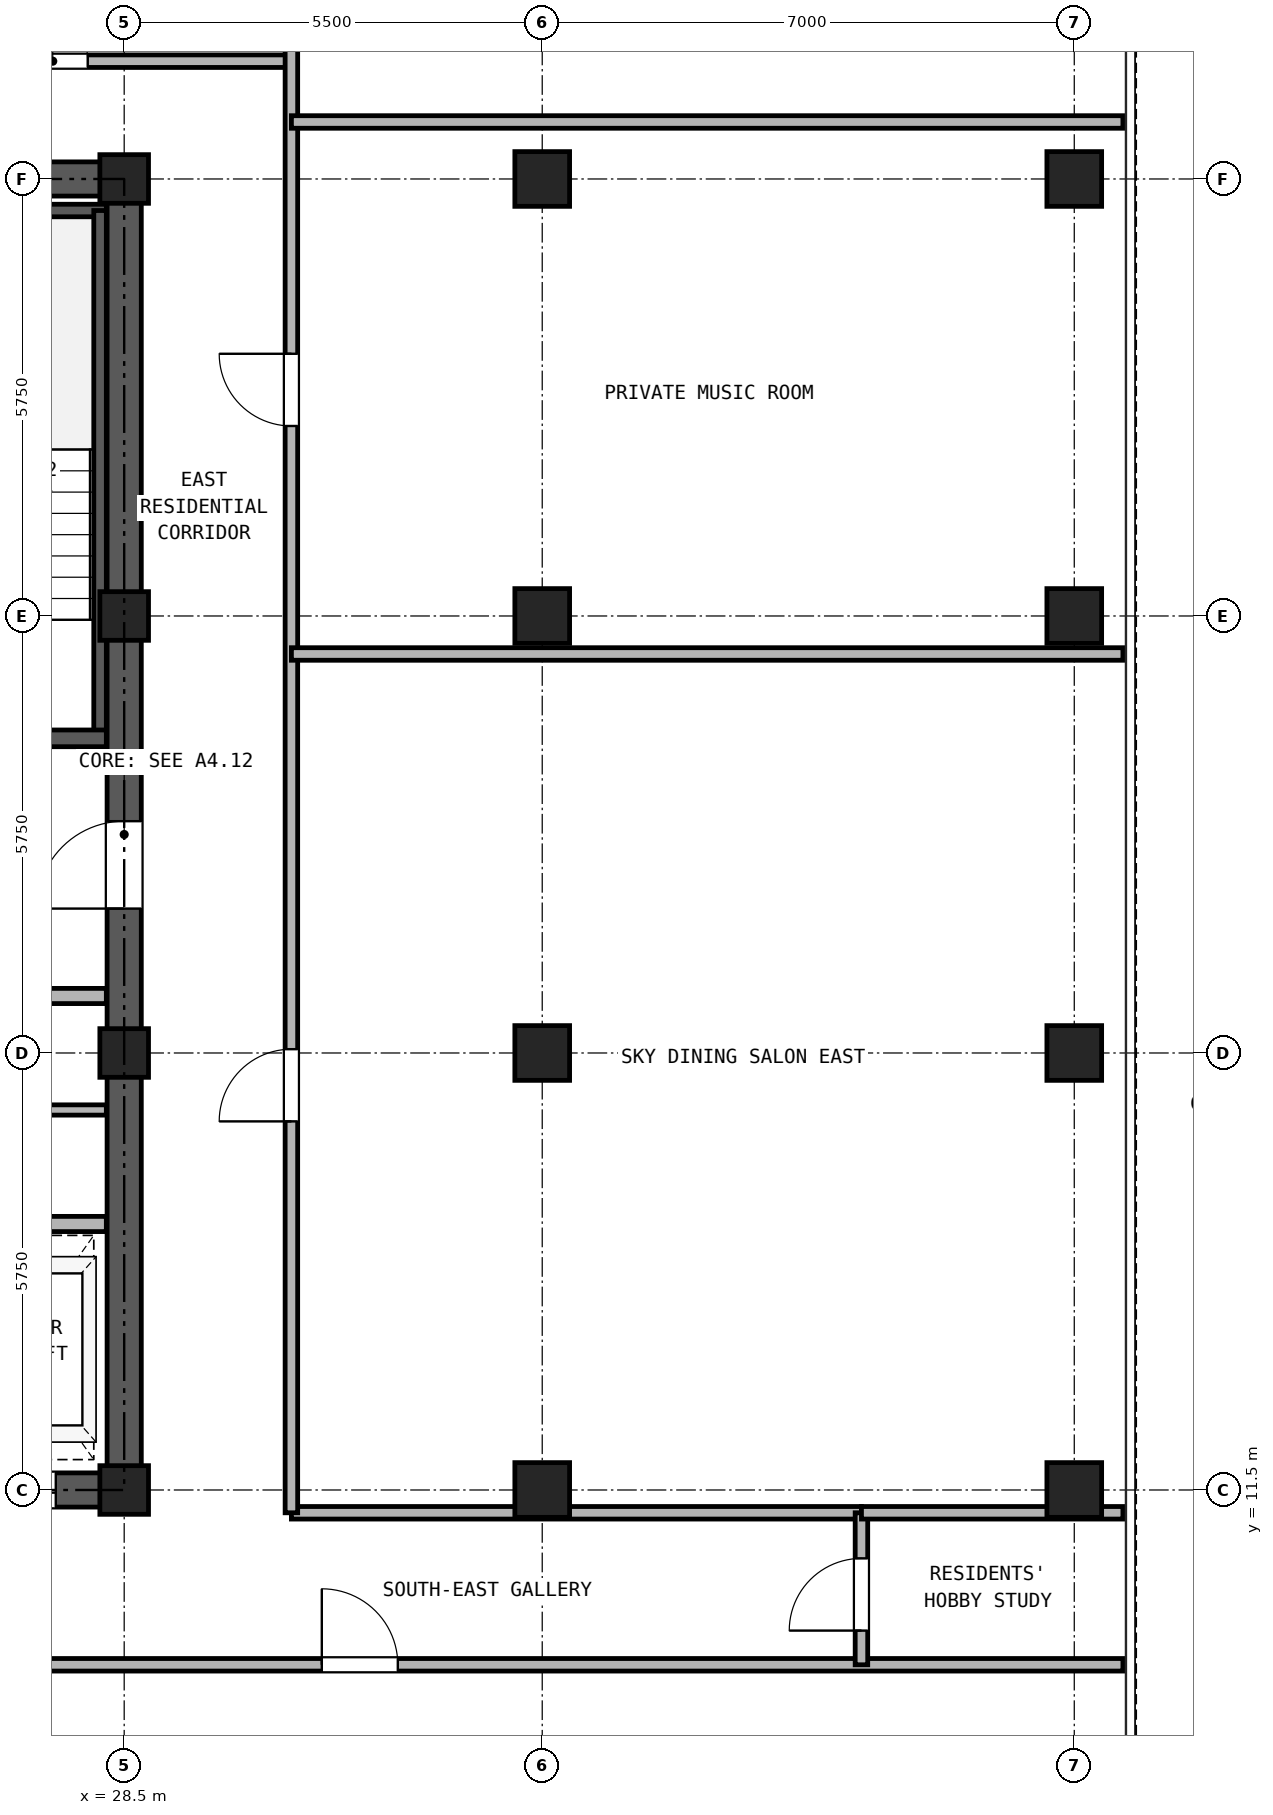
"""IFC4 building model, lengths in metres.
Left out: names, types, materials, properties, quantities, classifications, styles, units other than length and angle.
Written with IfcOpenShell. Run it as: python <this file> out.ifc"""

import sys

from ifc_helpers import new_model, si_unit, direction, frame, frame_2d, origin, origin_2d, place, context, subcontext, project, spatial, rectangle, hollow_rectangle, extrude, source, transform, mapped, element, fill, save


model = new_model("IFC4")
c1 = context("Model", 3, precision=1e-05, world=origin(), true_north=direction((0.0, 1.0)))
c2 = subcontext(c1, "Body", "Model", "MODEL_VIEW")
j1 = project(units=[si_unit("LENGTHUNIT", "METRE"), si_unit("PLANEANGLEUNIT", "RADIAN")], contexts=[c1])
p1 = place(None, origin())
s1 = spatial("IfcSite", under=j1, at=p1, CompositionType="ELEMENT")
p2 = place(p1, origin())
s2 = spatial("IfcBuilding", under=s1, at=p2, CompositionType="ELEMENT")
p3 = place(p2, frame((0.0, 0.0, 184.9)))
s3 = spatial("IfcBuildingStorey", under=s2, at=p3, CompositionType="ELEMENT", Elevation=184.9)
m1 = source(origin(), c2, "Body", "SweptSolid", [
    extrude(hollow_rectangle(XDim=0.72, YDim=0.72, WallThickness=0.04, at=origin_2d()), origin(), (0.0, 0.0, 1.0), 2.84),
])
for number, where, z_axis, x_axis in (
    (1, (41.0, 11.5, 0.0), (0.0, 0.0, 1.0), (1.0, 0.0, 0.0)),
    (2, (41.0, 17.25, 0.0), (0.0, 0.0, 1.0), (1.0, 0.0, 0.0)),
    (3, (41.0, 23.0, 0.0), (0.0, 0.0, 1.0), (1.0, 0.0, 0.0)),
    (4, (41.0, 28.75, 0.0), (0.0, 0.0, 1.0), (1.0, 0.0, 0.0)),
):
    element("IfcColumn", number, at=place(p3, frame(where, z_axis=z_axis, x_axis=x_axis)), inside=s3, PredefinedType="COLUMN", context=c2, shape_type="MappedRepresentation", body=[
        mapped(m1, transform((0.0, 0.0, 0.0), x_axis=(1.0, 0.0, 0.0), y_axis=(0.0, 1.0, 0.0), z_axis=(0.0, 0.0, 1.0), scale=1.0)),
    ])
m2 = source(origin(), c2, "Body", "SweptSolid", [
    extrude(hollow_rectangle(XDim=0.64, YDim=0.64, WallThickness=0.035, at=origin_2d()), origin(), (0.0, 0.0, 1.0), 2.84),
])
for number, where, z_axis, x_axis in (
    (5, (28.5, 11.5, 0.0), (0.0, 0.0, 1.0), (1.0, 0.0, 0.0)),
    (6, (28.5, 17.25, 0.0), (0.0, 0.0, 1.0), (1.0, 0.0, 0.0)),
    (7, (28.5, 23.0, 0.0), (0.0, 0.0, 1.0), (1.0, 0.0, 0.0)),
    (8, (28.5, 28.75, 0.0), (0.0, 0.0, 1.0), (1.0, 0.0, 0.0)),
):
    element("IfcColumn", number, at=place(p3, frame(where, z_axis=z_axis, x_axis=x_axis)), inside=s3, PredefinedType="COLUMN", context=c2, shape_type="MappedRepresentation", body=[
        mapped(m2, transform((0.0, 0.0, 0.0), x_axis=(1.0, 0.0, 0.0), y_axis=(0.0, 1.0, 0.0), z_axis=(0.0, 0.0, 1.0), scale=1.0)),
    ])
for number, where, z_axis, x_axis in (
    (9, (34.0, 11.5, 0.0), (0.0, 0.0, 1.0), (1.0, 0.0, 0.0)),
    (10, (34.0, 17.25, 0.0), (0.0, 0.0, 1.0), (1.0, 0.0, 0.0)),
    (11, (34.0, 23.0, 0.0), (0.0, 0.0, 1.0), (1.0, 0.0, 0.0)),
    (12, (34.0, 28.75, 0.0), (0.0, 0.0, 1.0), (1.0, 0.0, 0.0)),
):
    element("IfcColumn", number, at=place(p3, frame(where, z_axis=z_axis, x_axis=x_axis)), inside=s3, PredefinedType="COLUMN", context=c2, shape_type="MappedRepresentation", body=[
        mapped(m1, transform((0.0, 0.0, 0.0), x_axis=(1.0, 0.0, 0.0), y_axis=(0.0, 1.0, 0.0), z_axis=(0.0, 0.0, 1.0), scale=1.0)),
    ])
p4 = place(p3, frame((18.275, 11.5, 0.0), z_axis=(0.0, 0.0, 1.0), x_axis=(1.0, 0.0, 0.0)))
e13 = element("IfcWall", 13, at=p4, inside=s3, PredefinedType="SHEAR", context=c2, shape_type="SweptSolid", body=[
    extrude(rectangle(XDim=10.45, YDim=0.45, at=frame_2d((5.225, 0.0))), origin(), (0.0, 0.0, 1.0), 2.84),
])
p5 = place(p4, frame((1.825, 0.0, 0.0)))
e14 = element("IfcOpeningElement", 14, at=p5, cuts=e13, PredefinedType="OPENING", context=c2, shape_type="SweptSolid", body=[
    extrude(rectangle(XDim=0.95, YDim=2.15, at=frame_2d((0.475, 1.075))), frame((0.0, 0.235, 0.0), z_axis=(0.0, -1.0, 0.0), x_axis=(1.0, 0.0, 0.0)), (0.0, 0.0, 1.0), 0.47),
])
p6 = place(p4, frame((5.325, 0.0, 0.0)))
e15 = element("IfcOpeningElement", 15, at=p6, cuts=e13, PredefinedType="OPENING", context=c2, shape_type="SweptSolid", body=[
    extrude(rectangle(XDim=0.95, YDim=2.15, at=frame_2d((0.475, 1.075))), frame((0.0, 0.235, 0.0), z_axis=(0.0, -1.0, 0.0), x_axis=(1.0, 0.0, 0.0)), (0.0, 0.0, 1.0), 0.47),
])
p7 = place(p4, frame((8.225, 0.0, 0.0)))
e16 = element("IfcOpeningElement", 16, at=p7, cuts=e13, PredefinedType="OPENING", context=c2, shape_type="SweptSolid", body=[
    extrude(rectangle(XDim=1.1, YDim=2.25, at=frame_2d((0.55, 1.125))), frame((0.0, 0.235, 0.0), z_axis=(0.0, -1.0, 0.0), x_axis=(1.0, 0.0, 0.0)), (0.0, 0.0, 1.0), 0.47),
])
p8 = place(p3, frame((18.275, 28.75, 0.0), z_axis=(0.0, 0.0, 1.0), x_axis=(1.0, 0.0, 0.0)))
e17 = element("IfcWall", 17, at=p8, inside=s3, PredefinedType="SHEAR", context=c2, shape_type="SweptSolid", body=[
    extrude(rectangle(XDim=10.45, YDim=0.45, at=frame_2d((5.225, 0.0))), origin(), (0.0, 0.0, 1.0), 2.84),
])
p9 = place(p8, frame((4.105, 0.0, 0.0)))
e18 = element("IfcOpeningElement", 18, at=p9, cuts=e17, PredefinedType="OPENING", context=c2, shape_type="SweptSolid", body=[
    extrude(rectangle(XDim=0.9, YDim=2.05, at=frame_2d((0.45, 1.025))), frame((0.0, 0.235, 0.0), z_axis=(0.0, -1.0, 0.0), x_axis=(1.0, 0.0, 0.0)), (0.0, 0.0, 1.0), 0.47),
])
p10 = place(p8, frame((5.645, 0.0, 0.0)))
e19 = element("IfcOpeningElement", 19, at=p10, cuts=e17, PredefinedType="OPENING", context=c2, shape_type="SweptSolid", body=[
    extrude(rectangle(XDim=0.9, YDim=2.05, at=frame_2d((0.45, 1.025))), frame((0.0, 0.235, 0.0), z_axis=(0.0, -1.0, 0.0), x_axis=(1.0, 0.0, 0.0)), (0.0, 0.0, 1.0), 0.47),
])
p11 = place(p3, frame((28.5, 11.725, 0.0), z_axis=(0.0, 0.0, 1.0), x_axis=(0.0, 1.0, 0.0)))
e20 = element("IfcWall", 20, at=p11, inside=s3, PredefinedType="SHEAR", context=c2, shape_type="SweptSolid", body=[
    extrude(rectangle(XDim=16.8, YDim=0.45, at=frame_2d((8.4, 0.0))), origin(), (0.0, 0.0, 1.0), 2.84),
])
p12 = place(p11, frame((7.425, 0.0, 0.0)))
e21 = element("IfcOpeningElement", 21, at=p12, cuts=e20, PredefinedType="OPENING", context=c2, shape_type="SweptSolid", body=[
    extrude(rectangle(XDim=1.15, YDim=2.2, at=frame_2d((0.575, 1.1))), frame((0.0, 0.235, 0.0), z_axis=(0.0, -1.0, 0.0), x_axis=(1.0, 0.0, 0.0)), (0.0, 0.0, 1.0), 0.47),
])
p13 = place(p3, frame((25.13, 28.335, 0.0), z_axis=(0.0, 0.0, 1.0), x_axis=(1.0, 0.0, 0.0)))
e22 = element("IfcWall", 22, at=p13, inside=s3, PredefinedType="PARTITIONING", context=c2, shape_type="SweptSolid", body=[
    extrude(rectangle(XDim=3.135, YDim=0.165, at=frame_2d((1.567, 0.0))), origin(), (0.0, 0.0, 1.0), 2.84),
])
p14 = place(p3, frame((28.183, 21.39, 0.0), z_axis=(0.0, 0.0, 1.0), x_axis=(0.0, 1.0, 0.0)))
e23 = element("IfcWall", 23, at=p14, inside=s3, PredefinedType="PARTITIONING", context=c2, shape_type="SweptSolid", body=[
    extrude(rectangle(XDim=6.945, YDim=0.165, at=frame_2d((3.473, 0.0))), origin(), (0.0, 0.0, 1.0), 2.84),
])
p15 = place(p3, frame((25.13, 21.39, 0.0), z_axis=(0.0, 0.0, 1.0), x_axis=(1.0, 0.0, 0.0)))
e24 = element("IfcWall", 24, at=p15, inside=s3, PredefinedType="SOLIDWALL", context=c2, shape_type="SweptSolid", body=[
    extrude(rectangle(XDim=3.135, YDim=0.22, at=frame_2d((1.567, 0.0))), origin(), (0.0, 0.0, 1.0), 2.84),
])
p16 = place(p15, frame((0.92, 0.0, 0.0)))
e25 = element("IfcOpeningElement", 25, at=p16, cuts=e24, PredefinedType="OPENING", context=c2, shape_type="SweptSolid", body=[
    extrude(rectangle(XDim=1.15, YDim=2.2, at=frame_2d((0.575, 1.1))), frame((0.0, 0.12, 0.0), z_axis=(0.0, -1.0, 0.0), x_axis=(1.0, 0.0, 0.0)), (0.0, 0.0, 1.0), 0.24),
])
p17 = place(p3, frame((18.735, 18.0, 0.0), z_axis=(0.0, 0.0, 1.0), x_axis=(1.0, 0.0, 0.0)))
e26 = element("IfcWall", 26, at=p17, inside=s3, PredefinedType="PARTITIONING", context=c2, shape_type="SweptSolid", body=[
    extrude(rectangle(XDim=9.53, YDim=0.2, at=frame_2d((4.765, 0.0))), origin(), (0.0, 0.0, 1.0), 2.84),
])
p18 = place(p17, frame((0.515, 0.0, 0.0)))
e27 = element("IfcOpeningElement", 27, at=p18, cuts=e26, PredefinedType="OPENING", context=c2, shape_type="SweptSolid", body=[
    extrude(rectangle(XDim=1.3, YDim=2.3, at=frame_2d((0.65, 1.15))), frame((0.0, 0.11, 0.0), z_axis=(0.0, -1.0, 0.0), x_axis=(1.0, 0.0, 0.0)), (0.0, 0.0, 1.0), 0.22),
])
p19 = place(p17, frame((2.615, 0.0, 0.0)))
e28 = element("IfcOpeningElement", 28, at=p19, cuts=e26, PredefinedType="OPENING", context=c2, shape_type="SweptSolid", body=[
    extrude(rectangle(XDim=1.3, YDim=2.3, at=frame_2d((0.65, 1.15))), frame((0.0, 0.11, 0.0), z_axis=(0.0, -1.0, 0.0), x_axis=(1.0, 0.0, 0.0)), (0.0, 0.0, 1.0), 0.22),
])
p20 = place(p17, frame((7.115, 0.0, 0.0)))
e29 = element("IfcOpeningElement", 29, at=p20, cuts=e26, PredefinedType="OPENING", context=c2, shape_type="SweptSolid", body=[
    extrude(rectangle(XDim=1.0, YDim=2.15, at=frame_2d((0.5, 1.075))), frame((0.0, 0.11, 0.0), z_axis=(0.0, -1.0, 0.0), x_axis=(1.0, 0.0, 0.0)), (0.0, 0.0, 1.0), 0.22),
])
p21 = place(p3, frame((18.735, 15.0, 0.0), z_axis=(0.0, 0.0, 1.0), x_axis=(1.0, 0.0, 0.0)))
e30 = element("IfcWall", 30, at=p21, inside=s3, PredefinedType="PARTITIONING", context=c2, shape_type="SweptSolid", body=[
    extrude(rectangle(XDim=9.53, YDim=0.2, at=frame_2d((4.765, 0.0))), origin(), (0.0, 0.0, 1.0), 2.84),
])
p22 = place(p3, frame((23.3, 16.5, 0.0), z_axis=(0.0, 0.0, 1.0), x_axis=(1.0, 0.0, 0.0)))
e31 = element("IfcWall", 31, at=p22, inside=s3, PredefinedType="PARTITIONING", context=c2, shape_type="SweptSolid", body=[
    extrude(rectangle(XDim=4.965, YDim=0.135, at=frame_2d((2.482, 0.0))), origin(), (0.0, 0.0, 1.0), 2.84),
])
p23 = place(p22, frame((2.55, 0.0, 0.0)))
e32 = element("IfcOpeningElement", 32, at=p23, cuts=e31, PredefinedType="OPENING", context=c2, shape_type="SweptSolid", body=[
    extrude(rectangle(XDim=0.9, YDim=2.05, at=frame_2d((0.45, 1.025))), frame((0.0, 0.077, 0.0), z_axis=(0.0, -1.0, 0.0), x_axis=(1.0, 0.0, 0.0)), (0.0, 0.0, 1.0), 0.155),
])
p24 = place(p3, frame((0.16, 9.2, 0.0), z_axis=(0.0, 0.0, 1.0), x_axis=(1.0, 0.0, 0.0)))
e33 = element("IfcWall", 33, at=p24, inside=s3, PredefinedType="PARTITIONING", context=c2, shape_type="SweptSolid", body=[
    extrude(rectangle(XDim=41.48, YDim=0.165, at=frame_2d((20.74, 0.0))), origin(), (0.0, 0.0, 1.0), 2.84),
])
p25 = place(p24, frame((15.565, 0.0, 0.0)))
e34 = element("IfcOpeningElement", 34, at=p25, cuts=e33, PredefinedType="OPENING", context=c2, shape_type="SweptSolid", body=[
    extrude(rectangle(XDim=1.0, YDim=2.15, at=frame_2d((0.5, 1.075))), frame((0.0, 0.093, 0.0), z_axis=(0.0, -1.0, 0.0), x_axis=(1.0, 0.0, 0.0)), (0.0, 0.0, 1.0), 0.185),
])
p26 = place(p24, frame((30.94, 0.0, 0.0)))
e35 = element("IfcOpeningElement", 35, at=p26, cuts=e33, PredefinedType="OPENING", context=c2, shape_type="SweptSolid", body=[
    extrude(rectangle(XDim=1.0, YDim=2.15, at=frame_2d((0.5, 1.075))), frame((0.0, 0.093, 0.0), z_axis=(0.0, -1.0, 0.0), x_axis=(1.0, 0.0, 0.0)), (0.0, 0.0, 1.0), 0.185),
])
p27 = place(p3, frame((30.7, 11.2, 0.0), z_axis=(0.0, 0.0, 1.0), x_axis=(1.0, 0.0, 0.0)))
e36 = element("IfcWall", 36, at=p27, inside=s3, PredefinedType="PARTITIONING", context=c2, shape_type="SweptSolid", body=[
    extrude(rectangle(XDim=7.5, YDim=0.165, at=frame_2d((3.75, 0.0))), origin(), (0.0, 0.0, 1.0), 2.84),
])
p28 = place(p3, frame((38.2, 9.2, 0.0), z_axis=(0.0, 0.0, 1.0), x_axis=(0.0, 1.0, 0.0)))
e37 = element("IfcWall", 37, at=p28, inside=s3, PredefinedType="PARTITIONING", context=c2, shape_type="SweptSolid", body=[
    extrude(rectangle(XDim=2.0, YDim=0.165, at=frame_2d((1.0, 0.0))), origin(), (0.0, 0.0, 1.0), 2.84),
])
p29 = place(p28, frame((0.45, 0.0, 0.0)))
e38 = element("IfcOpeningElement", 38, at=p29, cuts=e37, PredefinedType="OPENING", context=c2, shape_type="SweptSolid", body=[
    extrude(rectangle(XDim=0.95, YDim=2.15, at=frame_2d((0.475, 1.075))), frame((0.0, 0.093, 0.0), z_axis=(0.0, -1.0, 0.0), x_axis=(1.0, 0.0, 0.0)), (0.0, 0.0, 1.0), 0.185),
])
p30 = place(p3, frame((16.3, 30.3, 0.0), z_axis=(0.0, 0.0, 1.0), x_axis=(1.0, 0.0, 0.0)))
e39 = element("IfcWall", 39, at=p30, inside=s3, PredefinedType="PARTITIONING", context=c2, shape_type="SweptSolid", body=[
    extrude(rectangle(XDim=14.4, YDim=0.165, at=frame_2d((7.2, 0.0))), origin(), (0.0, 0.0, 1.0), 2.84),
])
p31 = place(p30, frame((3.1, 0.0, 0.0)))
e40 = element("IfcOpeningElement", 40, at=p31, cuts=e39, PredefinedType="OPENING", context=c2, shape_type="SweptSolid", body=[
    extrude(rectangle(XDim=0.95, YDim=2.15, at=frame_2d((0.475, 1.075))), frame((0.0, 0.093, 0.0), z_axis=(0.0, -1.0, 0.0), x_axis=(1.0, 0.0, 0.0)), (0.0, 0.0, 1.0), 0.185),
])
p32 = place(p30, frame((8.0, 0.0, 0.0)))
e41 = element("IfcOpeningElement", 41, at=p32, cuts=e39, PredefinedType="OPENING", context=c2, shape_type="SweptSolid", body=[
    extrude(rectangle(XDim=0.95, YDim=2.15, at=frame_2d((0.475, 1.075))), frame((0.0, 0.093, 0.0), z_axis=(0.0, -1.0, 0.0), x_axis=(1.0, 0.0, 0.0)), (0.0, 0.0, 1.0), 0.185),
])
p33 = place(p30, frame((10.8, 0.0, 0.0)))
e42 = element("IfcOpeningElement", 42, at=p33, cuts=e39, PredefinedType="OPENING", context=c2, shape_type="SweptSolid", body=[
    extrude(rectangle(XDim=0.92, YDim=2.1, at=frame_2d((0.46, 1.05))), frame((0.0, 0.093, 0.0), z_axis=(0.0, -1.0, 0.0), x_axis=(1.0, 0.0, 0.0)), (0.0, 0.0, 1.0), 0.185),
])
p34 = place(p3, frame((30.7, 11.2, 0.0), z_axis=(0.0, 0.0, 1.0), x_axis=(0.0, 1.0, 0.0)))
e43 = element("IfcWall", 43, at=p34, inside=s3, PredefinedType="PARTITIONING", context=c2, shape_type="SweptSolid", body=[
    extrude(rectangle(XDim=23.94, YDim=0.165, at=frame_2d((11.97, 0.0))), origin(), (0.0, 0.0, 1.0), 2.84),
])
p35 = place(p34, frame((5.15, 0.0, 0.0)))
e44 = element("IfcOpeningElement", 44, at=p35, cuts=e43, PredefinedType="OPENING", context=c2, shape_type="SweptSolid", body=[
    extrude(rectangle(XDim=0.95, YDim=2.15, at=frame_2d((0.475, 1.075))), frame((0.0, 0.093, 0.0), z_axis=(0.0, -1.0, 0.0), x_axis=(1.0, 0.0, 0.0)), (0.0, 0.0, 1.0), 0.185),
])
p36 = place(p34, frame((14.3, 0.0, 0.0)))
e45 = element("IfcOpeningElement", 45, at=p36, cuts=e43, PredefinedType="OPENING", context=c2, shape_type="SweptSolid", body=[
    extrude(rectangle(XDim=0.95, YDim=2.15, at=frame_2d((0.475, 1.075))), frame((0.0, 0.093, 0.0), z_axis=(0.0, -1.0, 0.0), x_axis=(1.0, 0.0, 0.0)), (0.0, 0.0, 1.0), 0.185),
])
p37 = place(p34, frame((20.62, 0.0, 0.0)))
e46 = element("IfcOpeningElement", 46, at=p37, cuts=e43, PredefinedType="OPENING", context=c2, shape_type="SweptSolid", body=[
    extrude(rectangle(XDim=0.95, YDim=2.15, at=frame_2d((0.475, 1.075))), frame((0.0, 0.093, 0.0), z_axis=(0.0, -1.0, 0.0), x_axis=(1.0, 0.0, 0.0)), (0.0, 0.0, 1.0), 0.185),
])
p38 = place(p3, frame((38.2, 11.2, 0.0), z_axis=(0.0, 0.0, 1.0), x_axis=(1.0, 0.0, 0.0)))
e47 = element("IfcWall", 47, at=p38, inside=s3, PredefinedType="PARTITIONING", context=c2, shape_type="SweptSolid", body=[
    extrude(rectangle(XDim=3.44, YDim=0.165, at=frame_2d((1.72, 0.0))), origin(), (0.0, 0.0, 1.0), 2.84),
])
for number, where, z_axis, x_axis in (
    (48, (30.7, 22.5, 0.0), (0.0, 0.0, 1.0), (1.0, 0.0, 0.0)),
    (49, (30.7, 29.5, 0.0), (0.0, 0.0, 1.0), (1.0, 0.0, 0.0)),
):
    element("IfcWall", number, at=place(p3, frame(where, z_axis=z_axis, x_axis=x_axis)), inside=s3, PredefinedType="PARTITIONING", context=c2, shape_type="SweptSolid", body=[
        extrude(rectangle(XDim=10.94, YDim=0.165, at=frame_2d((5.47, 0.0))), origin(), (0.0, 0.0, 1.0), 2.84),
    ])
p39 = place(p12, origin())
e50 = element("IfcDoor", 50, at=p39, inside=s3, OperationType="SINGLE_SWING_LEFT", PredefinedType="DOOR", context=c2, shape_type="SweptSolid", body=[
    extrude(rectangle(XDim=1.15, YDim=2.2, at=frame_2d((0.575, 1.1))), frame((0.0, 0.025, 0.0), z_axis=(0.0, -1.0, 0.0), x_axis=(1.0, 0.0, 0.0)), (0.0, 0.0, 1.0), 0.05),
])
fill(e21, e50)
p40 = place(p7, frame((1.1, 0.0, 0.0), z_axis=(0.0, 0.0, 1.0), x_axis=(-1.0, 0.0, 0.0)))
e51 = element("IfcDoor", 51, at=p40, inside=s3, OperationType="DOUBLE_DOOR_SLIDING", PredefinedType="DOOR", context=c2, shape_type="SweptSolid", body=[
    extrude(rectangle(XDim=1.1, YDim=2.25, at=frame_2d((0.55, 1.125))), frame((0.0, 0.025, 0.0), z_axis=(0.0, -1.0, 0.0), x_axis=(1.0, 0.0, 0.0)), (0.0, 0.0, 1.0), 0.05),
])
fill(e16, e51)
p41 = place(p26, frame((1.0, 0.0, 0.0), z_axis=(0.0, 0.0, 1.0), x_axis=(-1.0, 0.0, 0.0)))
e52 = element("IfcDoor", 52, at=p41, inside=s3, OperationType="SINGLE_SWING_LEFT", PredefinedType="DOOR", context=c2, shape_type="SweptSolid", body=[
    extrude(rectangle(XDim=1.0, YDim=2.15, at=frame_2d((0.5, 1.075))), frame((0.0, 0.025, 0.0), z_axis=(0.0, -1.0, 0.0), x_axis=(1.0, 0.0, 0.0)), (0.0, 0.0, 1.0), 0.05),
])
fill(e35, e52)
p42 = place(p29, origin())
e53 = element("IfcDoor", 53, at=p42, inside=s3, OperationType="SINGLE_SWING_LEFT", PredefinedType="DOOR", context=c2, shape_type="SweptSolid", body=[
    extrude(rectangle(XDim=0.95, YDim=2.15, at=frame_2d((0.475, 1.075))), frame((0.0, 0.025, 0.0), z_axis=(0.0, -1.0, 0.0), x_axis=(1.0, 0.0, 0.0)), (0.0, 0.0, 1.0), 0.05),
])
fill(e38, e53)
p43 = place(p35, origin())
e54 = element("IfcDoor", 54, at=p43, inside=s3, OperationType="SINGLE_SWING_LEFT", PredefinedType="DOOR", context=c2, shape_type="SweptSolid", body=[
    extrude(rectangle(XDim=0.95, YDim=2.15, at=frame_2d((0.475, 1.075))), frame((0.0, 0.025, 0.0), z_axis=(0.0, -1.0, 0.0), x_axis=(1.0, 0.0, 0.0)), (0.0, 0.0, 1.0), 0.05),
])
fill(e44, e54)
p44 = place(p36, origin())
e55 = element("IfcDoor", 55, at=p44, inside=s3, OperationType="SINGLE_SWING_RIGHT", PredefinedType="DOOR", context=c2, shape_type="SweptSolid", body=[
    extrude(rectangle(XDim=0.95, YDim=2.15, at=frame_2d((0.475, 1.075))), frame((0.0, 0.025, 0.0), z_axis=(0.0, -1.0, 0.0), x_axis=(1.0, 0.0, 0.0)), (0.0, 0.0, 1.0), 0.05),
])
fill(e45, e55)
p45 = place(p33, origin())
e56 = element("IfcDoor", 56, at=p45, inside=s3, OperationType="SINGLE_SWING_LEFT", PredefinedType="DOOR", context=c2, shape_type="SweptSolid", body=[
    extrude(rectangle(XDim=0.92, YDim=2.1, at=frame_2d((0.46, 1.05))), frame((0.0, 0.025, 0.0), z_axis=(0.0, -1.0, 0.0), x_axis=(1.0, 0.0, 0.0)), (0.0, 0.0, 1.0), 0.05),
])
fill(e42, e56)
save(model, sys.argv[1])
